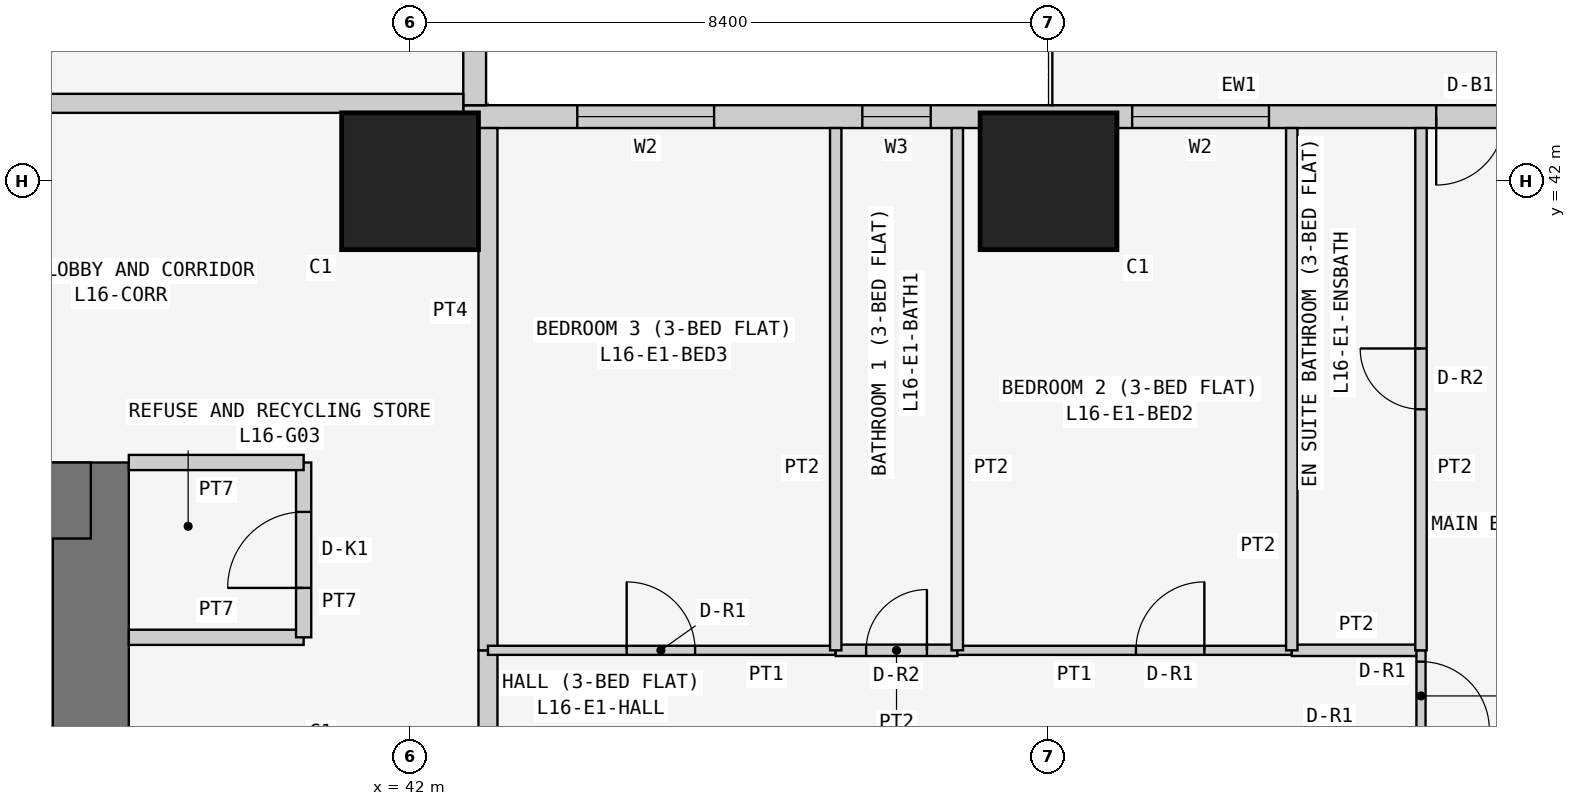
"""IFC4 building model, lengths in metres.
Left out: names, types, materials, properties, quantities, classifications, styles, units other than length and angle.
Written with IfcOpenShell. Run it as: python <this file> out.ifc"""

import sys

from ifc_helpers import new_model, si_unit, direction, frame, frame_2d, origin, origin_2d, place, context, subcontext, project, spatial, rectangle, extrude, element, fill, save


model = new_model("IFC4")
c1 = context("Model", 3, precision=1e-05, world=origin(), true_north=direction((0.0, 1.0)))
c2 = subcontext(c1, "Body", "Model", "MODEL_VIEW")
j1 = project(units=[si_unit("LENGTHUNIT", "METRE"), si_unit("PLANEANGLEUNIT", "RADIAN")], contexts=[c1])
p1 = place(None, origin())
s1 = spatial("IfcSite", under=j1, at=p1, CompositionType="ELEMENT")
p2 = place(p1, origin())
s2 = spatial("IfcBuilding", under=s1, at=p2, CompositionType="ELEMENT")
p3 = place(p2, frame((0.0, 0.0, 66.9)))
s3 = spatial("IfcBuildingStorey", under=s2, at=p3, CompositionType="ELEMENT", Elevation=66.9)
for number, where, z_axis, x_axis in (
    (1, (42.0, 42.0, 0.0), (0.0, 0.0, 1.0), (1.0, 0.0, 0.0)),
    (2, (50.4, 42.0, 0.0), (0.0, 0.0, 1.0), (1.0, 0.0, 0.0)),
):
    element("IfcColumn", number, at=place(p3, frame(where, z_axis=z_axis, x_axis=x_axis)), inside=s3, PredefinedType="COLUMN", context=c2, shape_type="SweptSolid", body=[
        extrude(rectangle(XDim=1.8, YDim=1.8, at=origin_2d()), origin(), (0.0, 0.0, 1.0), 3.6),
    ])
p4 = place(p3, frame((37.8, 21.0, 0.0), z_axis=(0.0, 0.0, 1.0), x_axis=(0.0, 1.0, 0.0)))
e3 = element("IfcWall", 3, at=p4, inside=s3, PredefinedType="SHEAR", context=c2, shape_type="SweptSolid", body=[
    extrude(rectangle(XDim=17.3, YDim=1.0, at=frame_2d((8.65, 0.0))), origin(), (0.0, 0.0, 1.0), 3.6),
])
p5 = place(p4, frame((5.2, 0.0, 0.0)))
e4 = element("IfcOpeningElement", 4, at=p5, cuts=e3, PredefinedType="OPENING", context=c2, shape_type="SweptSolid", body=[
    extrude(rectangle(XDim=1.2, YDim=2.1, at=frame_2d((0.6, 1.05))), frame((0.0, 0.51, 0.0), z_axis=(0.0, -1.0, 0.0), x_axis=(1.0, 0.0, 0.0)), (0.0, 0.0, 1.0), 1.02),
])
p6 = place(p3, frame((37.8, 37.8, 0.0), z_axis=(0.0, 0.0, 1.0), x_axis=(-1.0, 0.0, 0.0)))
e5 = element("IfcWall", 5, at=p6, inside=s3, PredefinedType="SHEAR", context=c2, shape_type="SweptSolid", body=[
    extrude(rectangle(XDim=17.3, YDim=1.0, at=frame_2d((8.65, 0.0))), origin(), (0.0, 0.0, 1.0), 3.6),
])
p7 = place(p3, frame((58.4, 42.85, 0.0), z_axis=(0.0, 0.0, 1.0), x_axis=(-1.0, 0.0, 0.0)))
e6 = element("IfcWall", 6, at=p7, inside=s3, PredefinedType="SOLIDWALL", context=c2, shape_type="SweptSolid", body=[
    extrude(rectangle(XDim=15.7, YDim=0.3, at=frame_2d((7.85, 0.0))), origin(), (0.0, 0.0, 1.0), 3.45),
])
p8 = place(p7, frame((12.4, 0.0, 0.9)))
e7 = element("IfcOpeningElement", 7, at=p8, cuts=e6, PredefinedType="OPENING", context=c2, shape_type="SweptSolid", body=[
    extrude(rectangle(XDim=1.8, YDim=1.5, at=frame_2d((0.9, 0.75))), frame((0.0, 0.16, 0.0), z_axis=(0.0, -1.0, 0.0), x_axis=(1.0, 0.0, 0.0)), (0.0, 0.0, 1.0), 0.32),
])
p9 = place(p7, frame((9.55, 0.0, 1.5)))
e8 = element("IfcOpeningElement", 8, at=p9, cuts=e6, PredefinedType="OPENING", context=c2, shape_type="SweptSolid", body=[
    extrude(rectangle(XDim=0.9, YDim=0.7, at=frame_2d((0.45, 0.35))), frame((0.0, 0.16, 0.0), z_axis=(0.0, -1.0, 0.0), x_axis=(1.0, 0.0, 0.0)), (0.0, 0.0, 1.0), 0.32),
])
p10 = place(p7, frame((5.1, 0.0, 0.9)))
e9 = element("IfcOpeningElement", 9, at=p10, cuts=e6, PredefinedType="OPENING", context=c2, shape_type="SweptSolid", body=[
    extrude(rectangle(XDim=1.8, YDim=1.5, at=frame_2d((0.9, 0.75))), frame((0.0, 0.16, 0.0), z_axis=(0.0, -1.0, 0.0), x_axis=(1.0, 0.0, 0.0)), (0.0, 0.0, 1.0), 0.32),
])
p11 = place(p7, frame((2.0, 0.0, 0.0)))
e10 = element("IfcOpeningElement", 10, at=p11, cuts=e6, PredefinedType="OPENING", context=c2, shape_type="SweptSolid", body=[
    extrude(rectangle(XDim=0.9, YDim=2.4, at=frame_2d((0.45, 1.2))), frame((0.0, 0.16, 0.0), z_axis=(0.0, -1.0, 0.0), x_axis=(1.0, 0.0, 0.0)), (0.0, 0.0, 1.0), 0.32),
])
p12 = place(p7, frame((0.7, 0.0, 0.9)))
e11 = element("IfcOpeningElement", 11, at=p12, cuts=e6, PredefinedType="OPENING", context=c2, shape_type="SweptSolid", body=[
    extrude(rectangle(XDim=1.2, YDim=1.5, at=frame_2d((0.6, 0.75))), frame((0.0, 0.16, 0.0), z_axis=(0.0, -1.0, 0.0), x_axis=(1.0, 0.0, 0.0)), (0.0, 0.0, 1.0), 0.32),
])
p13 = place(p3, frame((42.85, 43.0, 0.0), z_axis=(0.0, 0.0, 1.0), x_axis=(0.0, 1.0, 0.0)))
e12 = element("IfcWall", 12, at=p13, inside=s3, PredefinedType="SOLIDWALL", context=c2, shape_type="SweptSolid", body=[
    extrude(rectangle(XDim=15.4, YDim=0.3, at=frame_2d((7.7, 0.0))), origin(), (0.0, 0.0, 1.0), 3.45),
])
p14 = place(p13, frame((1.2, 0.0, 0.9)))
e13 = element("IfcOpeningElement", 13, at=p14, cuts=e12, PredefinedType="OPENING", context=c2, shape_type="SweptSolid", body=[
    extrude(rectangle(XDim=1.8, YDim=1.5, at=frame_2d((0.9, 0.75))), frame((0.0, 0.16, 0.0), z_axis=(0.0, -1.0, 0.0), x_axis=(1.0, 0.0, 0.0)), (0.0, 0.0, 1.0), 0.32),
])
p15 = place(p13, frame((4.95, 0.0, 1.5)))
e14 = element("IfcOpeningElement", 14, at=p15, cuts=e12, PredefinedType="OPENING", context=c2, shape_type="SweptSolid", body=[
    extrude(rectangle(XDim=0.9, YDim=0.7, at=frame_2d((0.45, 0.35))), frame((0.0, 0.16, 0.0), z_axis=(0.0, -1.0, 0.0), x_axis=(1.0, 0.0, 0.0)), (0.0, 0.0, 1.0), 0.32),
])
p16 = place(p13, frame((8.5, 0.0, 0.9)))
e15 = element("IfcOpeningElement", 15, at=p16, cuts=e12, PredefinedType="OPENING", context=c2, shape_type="SweptSolid", body=[
    extrude(rectangle(XDim=1.8, YDim=1.5, at=frame_2d((0.9, 0.75))), frame((0.0, 0.16, 0.0), z_axis=(0.0, -1.0, 0.0), x_axis=(1.0, 0.0, 0.0)), (0.0, 0.0, 1.0), 0.32),
])
p17 = place(p13, frame((12.5, 0.0, 0.0)))
e16 = element("IfcOpeningElement", 16, at=p17, cuts=e12, PredefinedType="OPENING", context=c2, shape_type="SweptSolid", body=[
    extrude(rectangle(XDim=0.9, YDim=2.4, at=frame_2d((0.45, 1.2))), frame((0.0, 0.16, 0.0), z_axis=(0.0, -1.0, 0.0), x_axis=(1.0, 0.0, 0.0)), (0.0, 0.0, 1.0), 0.32),
])
p18 = place(p13, frame((13.5, 0.0, 0.9)))
e17 = element("IfcOpeningElement", 17, at=p18, cuts=e12, PredefinedType="OPENING", context=c2, shape_type="SweptSolid", body=[
    extrude(rectangle(XDim=1.2, YDim=1.5, at=frame_2d((0.6, 0.75))), frame((0.0, 0.16, 0.0), z_axis=(0.0, -1.0, 0.0), x_axis=(1.0, 0.0, 0.0)), (0.0, 0.0, 1.0), 0.32),
])
p19 = place(p3, frame((38.3, 36.0, 0.0), z_axis=(0.0, 0.0, 1.0), x_axis=(1.0, 0.0, 0.0)))
e18 = element("IfcWall", 18, at=p19, inside=s3, PredefinedType="PARTITIONING", context=c2, shape_type="SweptSolid", body=[
    extrude(rectangle(XDim=2.3, YDim=0.2, at=frame_2d((1.15, 0.0))), origin(), (0.0, 0.0, 1.0), 3.45),
])
p20 = place(p3, frame((40.6, 36.0, 0.0), z_axis=(0.0, 0.0, 1.0), x_axis=(0.0, 1.0, 0.0)))
e19 = element("IfcWall", 19, at=p20, inside=s3, PredefinedType="PARTITIONING", context=c2, shape_type="SweptSolid", body=[
    extrude(rectangle(XDim=2.3, YDim=0.2, at=frame_2d((1.15, 0.0))), origin(), (0.0, 0.0, 1.0), 3.45),
])
p21 = place(p20, frame((0.65, 0.0, 0.0)))
e20 = element("IfcOpeningElement", 20, at=p21, cuts=e19, PredefinedType="OPENING", context=c2, shape_type="SweptSolid", body=[
    extrude(rectangle(XDim=1.0, YDim=2.1, at=frame_2d((0.5, 1.05))), frame((0.0, 0.11, 0.0), z_axis=(0.0, -1.0, 0.0), x_axis=(1.0, 0.0, 0.0)), (0.0, 0.0, 1.0), 0.22),
])
p22 = place(p3, frame((40.6, 38.3, 0.0), z_axis=(0.0, 0.0, 1.0), x_axis=(-1.0, 0.0, 0.0)))
e21 = element("IfcWall", 21, at=p22, inside=s3, PredefinedType="PARTITIONING", context=c2, shape_type="SweptSolid", body=[
    extrude(rectangle(XDim=2.3, YDim=0.2, at=frame_2d((1.15, 0.0))), origin(), (0.0, 0.0, 1.0), 3.45),
])
p23 = place(p3, frame((36.229, 43.025, 0.0), z_axis=(0.0, 0.0, 1.0), x_axis=(1.0, 0.0, 0.0)))
e22 = element("IfcWall", 22, at=p23, inside=s3, PredefinedType="PARTITIONING", context=c2, shape_type="SweptSolid", body=[
    extrude(rectangle(XDim=6.471, YDim=0.25, at=frame_2d((3.235, 0.0))), origin(), (0.0, 0.0, 1.0), 3.45),
])
p24 = place(p3, frame((43.025, 35.829, 0.0), z_axis=(0.0, 0.0, 1.0), x_axis=(0.0, -1.0, 0.0)))
e23 = element("IfcWall", 23, at=p24, inside=s3, PredefinedType="PARTITIONING", context=c2, shape_type="SweptSolid", body=[
    extrude(rectangle(XDim=1.2, YDim=0.25, at=frame_2d((0.6, 0.0))), origin(), (0.0, 0.0, 1.0), 3.45),
])
p25 = place(p3, frame((43.025, 42.7, 0.0), z_axis=(0.0, 0.0, 1.0), x_axis=(0.0, -1.0, 0.0)))
e24 = element("IfcWall", 24, at=p25, inside=s3, PredefinedType="PARTITIONING", context=c2, shape_type="SweptSolid", body=[
    extrude(rectangle(XDim=6.871, YDim=0.25, at=frame_2d((3.436, 0.0))), origin(), (0.0, 0.0, 1.0), 3.45),
])
p26 = place(p3, frame((47.6, 35.829, 0.0), z_axis=(0.0, 0.0, 1.0), x_axis=(-1.0, 0.0, 0.0)))
e25 = element("IfcWall", 25, at=p26, inside=s3, PredefinedType="PARTITIONING", context=c2, shape_type="SweptSolid", body=[
    extrude(rectangle(XDim=4.575, YDim=0.12, at=frame_2d((2.288, 0.0))), origin(), (0.0, 0.0, 1.0), 3.45),
])
p27 = place(p26, frame((1.85, 0.0, 0.0)))
e26 = element("IfcOpeningElement", 26, at=p27, cuts=e25, PredefinedType="OPENING", context=c2, shape_type="SweptSolid", body=[
    extrude(rectangle(XDim=0.9, YDim=2.1, at=frame_2d((0.45, 1.05))), frame((0.0, 0.07, 0.0), z_axis=(0.0, -1.0, 0.0), x_axis=(1.0, 0.0, 0.0)), (0.0, 0.0, 1.0), 0.14),
])
p28 = place(p3, frame((49.2, 35.829, 0.0), z_axis=(0.0, 0.0, 1.0), x_axis=(-1.0, 0.0, 0.0)))
e27 = element("IfcWall", 27, at=p28, inside=s3, PredefinedType="PARTITIONING", context=c2, shape_type="SweptSolid", body=[
    extrude(rectangle(XDim=1.6, YDim=0.15, at=frame_2d((0.8, 0.0))), origin(), (0.0, 0.0, 1.0), 3.45),
])
p29 = place(p28, frame((0.4, 0.0, 0.0)))
e28 = element("IfcOpeningElement", 28, at=p29, cuts=e27, PredefinedType="OPENING", context=c2, shape_type="SweptSolid", body=[
    extrude(rectangle(XDim=0.8, YDim=2.1, at=frame_2d((0.4, 1.05))), frame((0.0, 0.085, 0.0), z_axis=(0.0, -1.0, 0.0), x_axis=(1.0, 0.0, 0.0)), (0.0, 0.0, 1.0), 0.17),
])
p30 = place(p3, frame((53.6, 35.829, 0.0), z_axis=(0.0, 0.0, 1.0), x_axis=(-1.0, 0.0, 0.0)))
e29 = element("IfcWall", 29, at=p30, inside=s3, PredefinedType="PARTITIONING", context=c2, shape_type="SweptSolid", body=[
    extrude(rectangle(XDim=4.4, YDim=0.12, at=frame_2d((2.2, 0.0))), origin(), (0.0, 0.0, 1.0), 3.45),
])
p31 = place(p30, frame((1.15, 0.0, 0.0)))
e30 = element("IfcOpeningElement", 30, at=p31, cuts=e29, PredefinedType="OPENING", context=c2, shape_type="SweptSolid", body=[
    extrude(rectangle(XDim=0.9, YDim=2.1, at=frame_2d((0.45, 1.05))), frame((0.0, 0.07, 0.0), z_axis=(0.0, -1.0, 0.0), x_axis=(1.0, 0.0, 0.0)), (0.0, 0.0, 1.0), 0.14),
])
p32 = place(p3, frame((55.3, 35.829, 0.0), z_axis=(0.0, 0.0, 1.0), x_axis=(-1.0, 0.0, 0.0)))
e31 = element("IfcWall", 31, at=p32, inside=s3, PredefinedType="PARTITIONING", context=c2, shape_type="SweptSolid", body=[
    extrude(rectangle(XDim=1.7, YDim=0.15, at=frame_2d((0.85, 0.0))), origin(), (0.0, 0.0, 1.0), 3.45),
])
p33 = place(p3, frame((55.3, 34.629, 0.0), z_axis=(0.0, 0.0, 1.0), x_axis=(0.0, 1.0, 0.0)))
e32 = element("IfcWall", 32, at=p33, inside=s3, PredefinedType="PARTITIONING", context=c2, shape_type="SweptSolid", body=[
    extrude(rectangle(XDim=1.2, YDim=0.12, at=frame_2d((0.6, 0.0))), origin(), (0.0, 0.0, 1.0), 3.45),
])
p34 = place(p33, frame((0.151, 0.0, 0.0)))
e33 = element("IfcOpeningElement", 33, at=p34, cuts=e32, PredefinedType="OPENING", context=c2, shape_type="SweptSolid", body=[
    extrude(rectangle(XDim=0.9, YDim=2.1, at=frame_2d((0.45, 1.05))), frame((0.0, 0.07, 0.0), z_axis=(0.0, -1.0, 0.0), x_axis=(1.0, 0.0, 0.0)), (0.0, 0.0, 1.0), 0.14),
])
for number, where, z_axis, x_axis in (
    (34, (47.6, 35.829, 0.0), (0.0, 0.0, 1.0), (0.0, 1.0, 0.0)),
    (35, (49.2, 35.829, 0.0), (0.0, 0.0, 1.0), (0.0, 1.0, 0.0)),
    (36, (53.6, 35.829, 0.0), (0.0, 0.0, 1.0), (0.0, 1.0, 0.0)),
):
    element("IfcWall", number, at=place(p3, frame(where, z_axis=z_axis, x_axis=x_axis)), inside=s3, PredefinedType="PARTITIONING", context=c2, shape_type="SweptSolid", body=[
        extrude(rectangle(XDim=6.871, YDim=0.15, at=frame_2d((3.436, 0.0))), origin(), (0.0, 0.0, 1.0), 3.45),
    ])
p35 = place(p3, frame((55.3, 35.829, 0.0), z_axis=(0.0, 0.0, 1.0), x_axis=(0.0, 1.0, 0.0)))
e37 = element("IfcWall", 37, at=p35, inside=s3, PredefinedType="PARTITIONING", context=c2, shape_type="SweptSolid", body=[
    extrude(rectangle(XDim=6.871, YDim=0.15, at=frame_2d((3.436, 0.0))), origin(), (0.0, 0.0, 1.0), 3.45),
])
p36 = place(p35, frame((3.171, 0.0, 0.0)))
e38 = element("IfcOpeningElement", 38, at=p36, cuts=e37, PredefinedType="OPENING", context=c2, shape_type="SweptSolid", body=[
    extrude(rectangle(XDim=0.8, YDim=2.1, at=frame_2d((0.4, 1.05))), frame((0.0, 0.085, 0.0), z_axis=(0.0, -1.0, 0.0), x_axis=(1.0, 0.0, 0.0)), (0.0, 0.0, 1.0), 0.17),
])
p37 = place(p8, origin())
e39 = element("IfcWindow", 39, at=p37, inside=s3, PartitioningType="SINGLE_PANEL", PredefinedType="WINDOW", context=c2, shape_type="SweptSolid", body=[
    extrude(rectangle(XDim=1.8, YDim=1.5, at=frame_2d((0.9, 0.75))), frame((0.0, 0.03, 0.0), z_axis=(0.0, -1.0, 0.0), x_axis=(1.0, 0.0, 0.0)), (0.0, 0.0, 1.0), 0.06),
])
fill(e7, e39)
p38 = place(p9, origin())
e40 = element("IfcWindow", 40, at=p38, inside=s3, PartitioningType="SINGLE_PANEL", PredefinedType="WINDOW", context=c2, shape_type="SweptSolid", body=[
    extrude(rectangle(XDim=0.9, YDim=0.7, at=frame_2d((0.45, 0.35))), frame((0.0, 0.03, 0.0), z_axis=(0.0, -1.0, 0.0), x_axis=(1.0, 0.0, 0.0)), (0.0, 0.0, 1.0), 0.06),
])
fill(e8, e40)
p39 = place(p10, origin())
e41 = element("IfcWindow", 41, at=p39, inside=s3, PartitioningType="SINGLE_PANEL", PredefinedType="WINDOW", context=c2, shape_type="SweptSolid", body=[
    extrude(rectangle(XDim=1.8, YDim=1.5, at=frame_2d((0.9, 0.75))), frame((0.0, 0.03, 0.0), z_axis=(0.0, -1.0, 0.0), x_axis=(1.0, 0.0, 0.0)), (0.0, 0.0, 1.0), 0.06),
])
fill(e9, e41)
p40 = place(p11, origin())
e42 = element("IfcDoor", 42, at=p40, inside=s3, OperationType="SINGLE_SWING_RIGHT", PredefinedType="DOOR", context=c2, shape_type="SweptSolid", body=[
    extrude(rectangle(XDim=0.9, YDim=2.4, at=frame_2d((0.45, 1.2))), frame((0.0, 0.025, 0.0), z_axis=(0.0, -1.0, 0.0), x_axis=(1.0, 0.0, 0.0)), (0.0, 0.0, 1.0), 0.05),
])
fill(e10, e42)
p41 = place(p21, origin())
e43 = element("IfcDoor", 43, at=p41, inside=s3, OperationType="SINGLE_SWING_LEFT", PredefinedType="DOOR", context=c2, shape_type="SweptSolid", body=[
    extrude(rectangle(XDim=1.0, YDim=2.1, at=frame_2d((0.5, 1.05))), frame((0.0, 0.025, 0.0), z_axis=(0.0, -1.0, 0.0), x_axis=(1.0, 0.0, 0.0)), (0.0, 0.0, 1.0), 0.05),
])
fill(e20, e43)
p42 = place(p27, frame((0.9, 0.0, 0.0), z_axis=(0.0, 0.0, 1.0), x_axis=(-1.0, 0.0, 0.0)))
e44 = element("IfcDoor", 44, at=p42, inside=s3, OperationType="SINGLE_SWING_LEFT", PredefinedType="DOOR", context=c2, shape_type="SweptSolid", body=[
    extrude(rectangle(XDim=0.9, YDim=2.1, at=frame_2d((0.45, 1.05))), frame((0.0, 0.025, 0.0), z_axis=(0.0, -1.0, 0.0), x_axis=(1.0, 0.0, 0.0)), (0.0, 0.0, 1.0), 0.05),
])
fill(e26, e44)
p43 = place(p29, frame((0.8, 0.0, 0.0), z_axis=(0.0, 0.0, 1.0), x_axis=(-1.0, 0.0, 0.0)))
e45 = element("IfcDoor", 45, at=p43, inside=s3, OperationType="SINGLE_SWING_RIGHT", PredefinedType="DOOR", context=c2, shape_type="SweptSolid", body=[
    extrude(rectangle(XDim=0.8, YDim=2.1, at=frame_2d((0.4, 1.05))), frame((0.0, 0.025, 0.0), z_axis=(0.0, -1.0, 0.0), x_axis=(1.0, 0.0, 0.0)), (0.0, 0.0, 1.0), 0.05),
])
fill(e28, e45)
p44 = place(p31, frame((0.9, 0.0, 0.0), z_axis=(0.0, 0.0, 1.0), x_axis=(-1.0, 0.0, 0.0)))
e46 = element("IfcDoor", 46, at=p44, inside=s3, OperationType="SINGLE_SWING_RIGHT", PredefinedType="DOOR", context=c2, shape_type="SweptSolid", body=[
    extrude(rectangle(XDim=0.9, YDim=2.1, at=frame_2d((0.45, 1.05))), frame((0.0, 0.025, 0.0), z_axis=(0.0, -1.0, 0.0), x_axis=(1.0, 0.0, 0.0)), (0.0, 0.0, 1.0), 0.05),
])
fill(e30, e46)
p45 = place(p34, frame((0.9, 0.0, 0.0), z_axis=(0.0, 0.0, 1.0), x_axis=(-1.0, 0.0, 0.0)))
e47 = element("IfcDoor", 47, at=p45, inside=s3, OperationType="SINGLE_SWING_RIGHT", PredefinedType="DOOR", context=c2, shape_type="SweptSolid", body=[
    extrude(rectangle(XDim=0.9, YDim=2.1, at=frame_2d((0.45, 1.05))), frame((0.0, 0.025, 0.0), z_axis=(0.0, -1.0, 0.0), x_axis=(1.0, 0.0, 0.0)), (0.0, 0.0, 1.0), 0.05),
])
fill(e33, e47)
p46 = place(p36, origin())
e48 = element("IfcDoor", 48, at=p46, inside=s3, OperationType="SINGLE_SWING_RIGHT", PredefinedType="DOOR", context=c2, shape_type="SweptSolid", body=[
    extrude(rectangle(XDim=0.8, YDim=2.1, at=frame_2d((0.4, 1.05))), frame((0.0, 0.025, 0.0), z_axis=(0.0, -1.0, 0.0), x_axis=(1.0, 0.0, 0.0)), (0.0, 0.0, 1.0), 0.05),
])
fill(e38, e48)
save(model, sys.argv[1])
